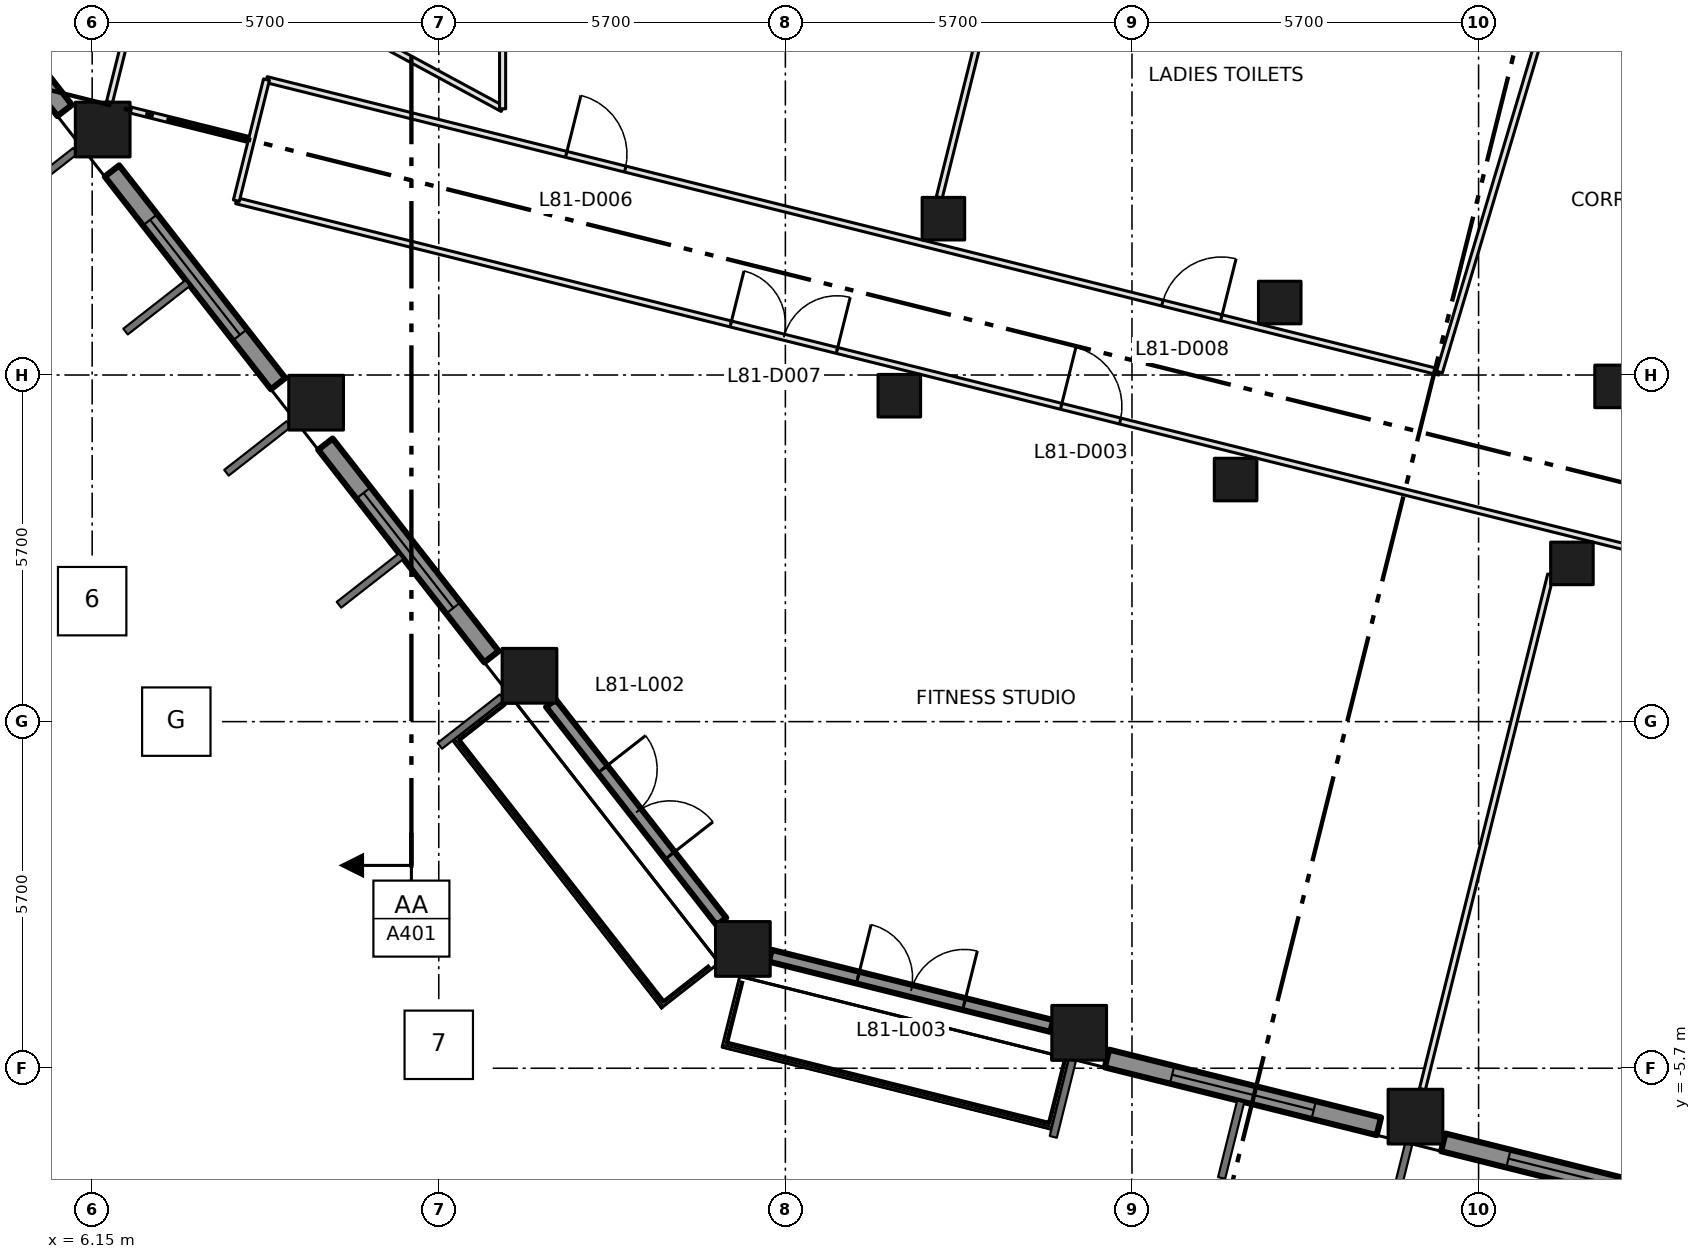
"""IFC4 building model, lengths in metres.
Left out: names, types, materials, properties, quantities, classifications, styles, units other than length and angle.
Written with IfcOpenShell. Run it as: python <this file> out.ifc"""

import sys

from ifc_helpers import new_model, si_unit, direction, frame, frame_2d, origin, origin_2d, place, context, subcontext, project, spatial, rectangle, extrude, element, fill, save


model = new_model("IFC4")
c1 = context("Model", 3, precision=1e-05, world=origin(), true_north=direction((0.0, 1.0)))
c2 = subcontext(c1, "Body", "Model", "MODEL_VIEW")
j1 = project(units=[si_unit("LENGTHUNIT", "METRE"), si_unit("PLANEANGLEUNIT", "RADIAN")], contexts=[c1])
p1 = place(None, origin())
s1 = spatial("IfcSite", under=j1, at=p1, CompositionType="ELEMENT")
p2 = place(p1, origin())
s2 = spatial("IfcBuilding", under=s1, at=p2, CompositionType="ELEMENT")
p3 = place(p2, frame((0.0, 0.0, 354.0)))
s3 = spatial("IfcBuildingStorey", under=s2, at=p3, CompositionType="ELEMENT", Elevation=354.0)
for number, where, z_axis, x_axis in (
    (1, (16.851, -3.738, 0.0), (0.0, 0.0, 1.0), (1.0, 0.0, 0.0)),
    (2, (13.342, 0.754, 0.0), (0.0, 0.0, 1.0), (1.0, 0.0, 0.0)),
    (3, (9.833, 5.245, 0.0), (0.0, 0.0, 1.0), (1.0, 0.0, 0.0)),
    (4, (6.323, 9.737, 0.0), (0.0, 0.0, 1.0), (1.0, 0.0, 0.0)),
    (5, (22.382, -5.117, 0.0), (0.0, 0.0, 1.0), (1.0, 0.0, 0.0)),
    (6, (27.912, -6.496, 0.0), (0.0, 0.0, 1.0), (1.0, 0.0, 0.0)),
):
    element("IfcColumn", number, at=place(p3, frame(where, z_axis=z_axis, x_axis=x_axis)), inside=s3, PredefinedType="COLUMN", context=c2, shape_type="SweptSolid", body=[
        extrude(rectangle(XDim=0.9, YDim=0.9, at=origin_2d()), origin(), (0.0, 0.0, 1.0), 4.2),
    ])
for number, where, z_axis, x_axis in (
    (7, (19.424, 5.36, 0.0), (0.0, 0.0, 1.0), (1.0, 0.0, 0.0)),
    (8, (24.954, 3.981, 0.0), (0.0, 0.0, 1.0), (1.0, 0.0, 0.0)),
    (9, (30.485, 2.602, 0.0), (0.0, 0.0, 1.0), (1.0, 0.0, 0.0)),
    (10, (20.149, 8.271, 0.0), (0.0, 0.0, 1.0), (1.0, 0.0, 0.0)),
    (11, (25.68, 6.892, 0.0), (0.0, 0.0, 1.0), (1.0, 0.0, 0.0)),
    (12, (31.211, 5.513, 0.0), (0.0, 0.0, 1.0), (1.0, 0.0, 0.0)),
):
    element("IfcColumn", number, at=place(p3, frame(where, z_axis=z_axis, x_axis=x_axis)), inside=s3, PredefinedType="COLUMN", context=c2, shape_type="SweptSolid", body=[
        extrude(rectangle(XDim=0.7, YDim=0.7, at=origin_2d()), origin(), (0.0, 0.0, 1.0), 4.2),
    ])
p4 = place(p3, frame((2.967, 13.547, 0.0), z_axis=(0.0, 0.0, 1.0), x_axis=(0.615486001463, -0.788147817356, 0.0)))
e13 = element("IfcWall", 13, at=p4, inside=s3, PredefinedType="SOLIDWALL", context=c2, shape_type="SweptSolid", body=[
    extrude(rectangle(XDim=4.437, YDim=0.3, at=frame_2d((2.219, 0.0))), origin(), (0.0, 0.0, 1.0), 3.2),
])
p5 = place(p4, frame((1.018, 0.0, 0.8)))
e14 = element("IfcOpeningElement", 14, at=p5, cuts=e13, PredefinedType="OPENING", context=c2, shape_type="SweptSolid", body=[
    extrude(rectangle(XDim=2.4, YDim=2.1, at=frame_2d((1.2, 1.05))), frame((0.0, 0.16, 0.0), z_axis=(0.0, -1.0, 0.0), x_axis=(1.0, 0.0, 0.0)), (0.0, 0.0, 1.0), 0.32),
])
p6 = place(p3, frame((6.476, 9.055, 0.0), z_axis=(0.0, 0.0, 1.0), x_axis=(0.615649380255, -0.788020203162, 0.0)))
e15 = element("IfcWall", 15, at=p6, inside=s3, PredefinedType="SOLIDWALL", context=c2, shape_type="SweptSolid", body=[
    extrude(rectangle(XDim=4.438, YDim=0.3, at=frame_2d((2.219, 0.0))), origin(), (0.0, 0.0, 1.0), 3.2),
])
p7 = place(p6, frame((1.019, 0.0, 0.8)))
e16 = element("IfcOpeningElement", 16, at=p7, cuts=e15, PredefinedType="OPENING", context=c2, shape_type="SweptSolid", body=[
    extrude(rectangle(XDim=2.4, YDim=2.1, at=frame_2d((1.2, 1.05))), frame((0.0, 0.16, 0.0), z_axis=(0.0, -1.0, 0.0), x_axis=(1.0, 0.0, 0.0)), (0.0, 0.0, 1.0), 0.32),
])
p8 = place(p3, frame((9.986, 4.563, 0.0), z_axis=(0.0, 0.0, 1.0), x_axis=(0.615592779411, -0.788064419915, 0.0)))
e17 = element("IfcWall", 17, at=p8, inside=s3, PredefinedType="SOLIDWALL", context=c2, shape_type="SweptSolid", body=[
    extrude(rectangle(XDim=4.436, YDim=0.3, at=frame_2d((2.218, 0.0))), origin(), (0.0, 0.0, 1.0), 3.2),
])
p9 = place(p8, frame((1.018, 0.0, 0.8)))
e18 = element("IfcOpeningElement", 18, at=p9, cuts=e17, PredefinedType="OPENING", context=c2, shape_type="SweptSolid", body=[
    extrude(rectangle(XDim=2.4, YDim=2.1, at=frame_2d((1.2, 1.05))), frame((0.0, 0.16, 0.0), z_axis=(0.0, -1.0, 0.0), x_axis=(1.0, 0.0, 0.0)), (0.0, 0.0, 1.0), 0.32),
])
p10 = place(p3, frame((13.694, 0.304, 0.0), z_axis=(0.0, 0.0, 1.0), x_axis=(0.615460024179, -0.788168103033, 0.0)))
e19 = element("IfcWall", 19, at=p10, inside=s3, PredefinedType="SOLIDWALL", context=c2, shape_type="SweptSolid", body=[
    extrude(rectangle(XDim=4.557, YDim=0.2, at=frame_2d((2.279, 0.0))), origin(), (0.0, 0.0, 1.0), 3.2),
])
p11 = place(p10, frame((1.379, 0.0, 0.0)))
e20 = element("IfcOpeningElement", 20, at=p11, cuts=e19, PredefinedType="OPENING", context=c2, shape_type="SweptSolid", body=[
    extrude(rectangle(XDim=1.8, YDim=2.9, at=frame_2d((0.9, 1.45))), frame((0.0, 0.11, 0.0), z_axis=(0.0, -1.0, 0.0), x_axis=(1.0, 0.0, 0.0)), (0.0, 0.0, 1.0), 0.22),
])
p12 = place(p3, frame((12.398, -0.199, 0.0), z_axis=(0.0, 0.0, 1.0), x_axis=(0.615638738903, -0.788028516719, 0.0)))
e21 = element("IfcWall", 21, at=p12, inside=s3, PredefinedType="SOLIDWALL", context=c2, shape_type="SweptSolid", body=[
    extrude(rectangle(XDim=5.36, YDim=0.4, at=frame_2d((2.68, 0.0))), origin(), (0.0, 0.0, 1.0), 0.3),
])
p13 = place(p3, frame((17.301, -3.85, 0.0), z_axis=(0.0, 0.0, 1.0), x_axis=(0.970286762598, -0.241957844111, 0.0)))
e22 = element("IfcWall", 22, at=p13, inside=s3, PredefinedType="SOLIDWALL", context=c2, shape_type="SweptSolid", body=[
    extrude(rectangle(XDim=4.773, YDim=0.2, at=frame_2d((2.386, 0.0))), origin(), (0.0, 0.0, 1.0), 3.2),
])
p14 = place(p13, frame((1.486, 0.0, 0.0)))
e23 = element("IfcOpeningElement", 23, at=p14, cuts=e22, PredefinedType="OPENING", context=c2, shape_type="SweptSolid", body=[
    extrude(rectangle(XDim=1.8, YDim=2.9, at=frame_2d((0.9, 1.45))), frame((0.0, 0.11, 0.0), z_axis=(0.0, -1.0, 0.0), x_axis=(1.0, 0.0, 0.0)), (0.0, 0.0, 1.0), 0.22),
])
p15 = place(p3, frame((16.694, -5.069, 0.0), z_axis=(0.0, 0.0, 1.0), x_axis=(0.970289679319, -0.241946147329, 0.0)))
e24 = element("IfcWall", 24, at=p15, inside=s3, PredefinedType="SOLIDWALL", context=c2, shape_type="SweptSolid", body=[
    extrude(rectangle(XDim=5.36, YDim=0.4, at=frame_2d((2.68, 0.0))), origin(), (0.0, 0.0, 1.0), 0.3),
])
p16 = place(p3, frame((22.839, -5.54, 0.0), z_axis=(0.0, 0.0, 1.0), x_axis=(0.970282587769, -0.241974585177, 0.0)))
e25 = element("IfcWall", 25, at=p16, inside=s3, PredefinedType="SOLIDWALL", context=c2, shape_type="SweptSolid", body=[
    extrude(rectangle(XDim=4.608, YDim=0.3, at=frame_2d((2.304, 0.0))), origin(), (0.0, 0.0, 1.0), 3.2),
])
p17 = place(p16, frame((1.104, 0.0, 0.8)))
e26 = element("IfcOpeningElement", 26, at=p17, cuts=e25, PredefinedType="OPENING", context=c2, shape_type="SweptSolid", body=[
    extrude(rectangle(XDim=2.4, YDim=2.1, at=frame_2d((1.2, 1.05))), frame((0.0, 0.16, 0.0), z_axis=(0.0, -1.0, 0.0), x_axis=(1.0, 0.0, 0.0)), (0.0, 0.0, 1.0), 0.32),
])
p18 = place(p3, frame((28.369, -6.919, 0.0), z_axis=(0.0, 0.0, 1.0), x_axis=(0.970298093093, -0.241912402618, 0.0)))
e27 = element("IfcWall", 27, at=p18, inside=s3, PredefinedType="SOLIDWALL", context=c2, shape_type="SweptSolid", body=[
    extrude(rectangle(XDim=4.609, YDim=0.3, at=frame_2d((2.305, 0.0))), origin(), (0.0, 0.0, 1.0), 3.2),
])
p19 = place(p18, frame((1.105, 0.0, 0.8)))
e28 = element("IfcOpeningElement", 28, at=p19, cuts=e27, PredefinedType="OPENING", context=c2, shape_type="SweptSolid", body=[
    extrude(rectangle(XDim=2.4, YDim=2.1, at=frame_2d((1.2, 1.05))), frame((0.0, 0.16, 0.0), z_axis=(0.0, -1.0, 0.0), x_axis=(1.0, 0.0, 0.0)), (0.0, 0.0, 1.0), 0.32),
])
p20 = place(p3, frame((8.521, 8.567, 0.0), z_axis=(0.0, 0.0, 1.0), x_axis=(0.970303035129, -0.241892579506, 0.0)))
e29 = element("IfcWall", 29, at=p20, inside=s3, PredefinedType="PARTITIONING", context=c2, shape_type="SweptSolid", body=[
    extrude(rectangle(XDim=28.5, YDim=0.1, at=frame_2d((14.25, 0.0))), origin(), (0.0, 0.0, 1.0), 3.9),
])
p21 = place(p20, frame((13.98, 0.0, 0.0)))
e30 = element("IfcOpeningElement", 30, at=p21, cuts=e29, PredefinedType="OPENING", context=c2, shape_type="SweptSolid", body=[
    extrude(rectangle(XDim=1.0, YDim=2.1, at=frame_2d((0.5, 1.05))), frame((0.0, 0.06, 0.0), z_axis=(0.0, -1.0, 0.0), x_axis=(1.0, 0.0, 0.0)), (0.0, 0.0, 1.0), 0.12),
])
p22 = place(p20, frame((8.38, 0.0, 0.0)))
e31 = element("IfcOpeningElement", 31, at=p22, cuts=e29, PredefinedType="OPENING", context=c2, shape_type="SweptSolid", body=[
    extrude(rectangle(XDim=1.8, YDim=2.1, at=frame_2d((0.9, 1.05))), frame((0.0, 0.06, 0.0), z_axis=(0.0, -1.0, 0.0), x_axis=(1.0, 0.0, 0.0)), (0.0, 0.0, 1.0), 0.12),
])
p23 = place(p3, frame((9.017, 10.558, 0.0), z_axis=(0.0, 0.0, 1.0), x_axis=(0.970286089829, -0.241960542, 0.0)))
e32 = element("IfcWall", 32, at=p23, inside=s3, PredefinedType="PARTITIONING", context=c2, shape_type="SweptSolid", body=[
    extrude(rectangle(XDim=19.879, YDim=0.1, at=frame_2d((9.94, 0.0))), origin(), (0.0, 0.0, 1.0), 3.9),
])
p24 = place(p23, frame((5.08, 0.0, 0.0)))
e33 = element("IfcOpeningElement", 33, at=p24, cuts=e32, PredefinedType="OPENING", context=c2, shape_type="SweptSolid", body=[
    extrude(rectangle(XDim=1.0, YDim=2.1, at=frame_2d((0.5, 1.05))), frame((0.0, 0.06, 0.0), z_axis=(0.0, -1.0, 0.0), x_axis=(1.0, 0.0, 0.0)), (0.0, 0.0, 1.0), 0.12),
])
p25 = place(p23, frame((15.184, 0.0, 0.0)))
e34 = element("IfcOpeningElement", 34, at=p25, cuts=e32, PredefinedType="OPENING", context=c2, shape_type="SweptSolid", body=[
    extrude(rectangle(XDim=1.0, YDim=2.1, at=frame_2d((0.5, 1.05))), frame((0.0, 0.06, 0.0), z_axis=(0.0, -1.0, 0.0), x_axis=(1.0, 0.0, 0.0)), (0.0, 0.0, 1.0), 0.12),
])
p26 = place(p3, frame((9.017, 10.558, 0.0), z_axis=(0.0, 0.0, 1.0), x_axis=(-0.241751728323, -0.970338137895, 0.0)))
e35 = element("IfcWall", 35, at=p26, inside=s3, PredefinedType="PARTITIONING", context=c2, shape_type="SweptSolid", body=[
    extrude(rectangle(XDim=2.052, YDim=0.1, at=frame_2d((1.026, 0.0))), origin(), (0.0, 0.0, 1.0), 3.9),
])
p27 = place(p3, frame((9.9, 11.7, 0.0), z_axis=(0.0, 0.0, 1.0), x_axis=(0.87965147249, -0.475618846291, 0.0)))
e36 = element("IfcWall", 36, at=p27, inside=s3, PredefinedType="PARTITIONING", context=c2, shape_type="SweptSolid", body=[
    extrude(rectangle(XDim=3.41, YDim=0.1, at=frame_2d((1.705, 0.0))), origin(), (0.0, 0.0, 1.0), 3.9),
])
p28 = place(p3, frame((12.9, 10.078, 0.0), z_axis=(0.0, 0.0, 1.0), x_axis=(0.0, 1.0, 0.0)))
e37 = element("IfcWall", 37, at=p28, inside=s3, PredefinedType="PARTITIONING", context=c2, shape_type="SweptSolid", body=[
    extrude(rectangle(XDim=4.022, YDim=0.1, at=frame_2d((2.011, 0.0))), origin(), (0.0, 0.0, 1.0), 3.9),
])
p29 = place(p3, frame((30.8, 14.1, 0.0), z_axis=(0.0, 0.0, 1.0), x_axis=(-0.286139929679, -0.958187842045, 0.0)))
e38 = element("IfcWall", 38, at=p29, inside=s3, PredefinedType="PARTITIONING", context=c2, shape_type="SweptSolid", body=[
    extrude(rectangle(XDim=8.717, YDim=0.1, at=frame_2d((4.358, 0.0))), origin(), (0.0, 0.0, 1.0), 3.9),
])
p30 = place(p3, frame((6.797, 11.638, 0.0), z_axis=(0.0, 0.0, 1.0), x_axis=(-0.242113049408, -0.970248046278, 0.0)))
e39 = element("IfcWall", 39, at=p30, inside=s3, PredefinedType="PARTITIONING", context=c2, shape_type="SweptSolid", body=[
    extrude(rectangle(XDim=1.495, YDim=0.1, at=frame_2d((0.748, 0.0))), origin(), (0.0, 0.0, 1.0), 3.9),
])
p31 = place(p3, frame((8.72, 9.574, 0.0), z_axis=(0.0, 0.0, 1.0), x_axis=(-0.970221168815, 0.24222073318, 0.0)))
e40 = element("IfcWall", 40, at=p31, inside=s3, PredefinedType="PARTITIONING", context=c2, shape_type="SweptSolid", body=[
    extrude(rectangle(XDim=2.007, YDim=0.1, at=frame_2d((1.003, 0.0))), origin(), (0.0, 0.0, 1.0), 3.9),
])
p32 = place(p3, frame((20.081, 8.621, 0.0), z_axis=(0.0, 0.0, 1.0), x_axis=(0.241904838353, 0.970299978966, 0.0)))
e41 = element("IfcWall", 41, at=p32, inside=s3, PredefinedType="PARTITIONING", context=c2, shape_type="SweptSolid", body=[
    extrude(rectangle(XDim=5.647, YDim=0.1, at=frame_2d((2.823, 0.0))), origin(), (0.0, 0.0, 1.0), 3.9),
])
p33 = place(p3, frame((28.026, -6.046, 0.0), z_axis=(0.0, 0.0, 1.0), x_axis=(0.241850505633, 0.970313523004, 0.0)))
e42 = element("IfcWall", 42, at=p33, inside=s3, PredefinedType="PARTITIONING", context=c2, shape_type="SweptSolid", body=[
    extrude(rectangle(XDim=8.721, YDim=0.1, at=frame_2d((4.36, 0.0))), origin(), (0.0, 0.0, 1.0), 3.9),
])
p34 = place(p7, origin())
e43 = element("IfcWindow", 43, at=p34, inside=s3, PartitioningType="DOUBLE_PANEL_VERTICAL", PredefinedType="WINDOW", context=c2, shape_type="SweptSolid", body=[
    extrude(rectangle(XDim=2.4, YDim=2.1, at=frame_2d((1.2, 1.05))), frame((0.0, 0.03, 0.0), z_axis=(0.0, -1.0, 0.0), x_axis=(1.0, 0.0, 0.0)), (0.0, 0.0, 1.0), 0.06),
])
fill(e16, e43)
p35 = place(p9, origin())
e44 = element("IfcWindow", 44, at=p35, inside=s3, PartitioningType="DOUBLE_PANEL_VERTICAL", PredefinedType="WINDOW", context=c2, shape_type="SweptSolid", body=[
    extrude(rectangle(XDim=2.4, YDim=2.1, at=frame_2d((1.2, 1.05))), frame((0.0, 0.03, 0.0), z_axis=(0.0, -1.0, 0.0), x_axis=(1.0, 0.0, 0.0)), (0.0, 0.0, 1.0), 0.06),
])
fill(e18, e44)
p36 = place(p11, origin())
e45 = element("IfcDoor", 45, at=p36, inside=s3, OperationType="DOUBLE_DOOR_SINGLE_SWING", PredefinedType="DOOR", context=c2, shape_type="SweptSolid", body=[
    extrude(rectangle(XDim=1.8, YDim=2.9, at=frame_2d((0.9, 1.45))), frame((0.0, 0.025, 0.0), z_axis=(0.0, -1.0, 0.0), x_axis=(1.0, 0.0, 0.0)), (0.0, 0.0, 1.0), 0.05),
])
fill(e20, e45)
p37 = place(p14, origin())
e46 = element("IfcDoor", 46, at=p37, inside=s3, OperationType="DOUBLE_DOOR_SINGLE_SWING", PredefinedType="DOOR", context=c2, shape_type="SweptSolid", body=[
    extrude(rectangle(XDim=1.8, YDim=2.9, at=frame_2d((0.9, 1.45))), frame((0.0, 0.025, 0.0), z_axis=(0.0, -1.0, 0.0), x_axis=(1.0, 0.0, 0.0)), (0.0, 0.0, 1.0), 0.05),
])
fill(e23, e46)
p38 = place(p17, origin())
e47 = element("IfcWindow", 47, at=p38, inside=s3, PartitioningType="DOUBLE_PANEL_VERTICAL", PredefinedType="WINDOW", context=c2, shape_type="SweptSolid", body=[
    extrude(rectangle(XDim=2.4, YDim=2.1, at=frame_2d((1.2, 1.05))), frame((0.0, 0.03, 0.0), z_axis=(0.0, -1.0, 0.0), x_axis=(1.0, 0.0, 0.0)), (0.0, 0.0, 1.0), 0.06),
])
fill(e26, e47)
p39 = place(p19, origin())
e48 = element("IfcWindow", 48, at=p39, inside=s3, PartitioningType="DOUBLE_PANEL_VERTICAL", PredefinedType="WINDOW", context=c2, shape_type="SweptSolid", body=[
    extrude(rectangle(XDim=2.4, YDim=2.1, at=frame_2d((1.2, 1.05))), frame((0.0, 0.03, 0.0), z_axis=(0.0, -1.0, 0.0), x_axis=(1.0, 0.0, 0.0)), (0.0, 0.0, 1.0), 0.06),
])
fill(e28, e48)
p40 = place(p21, origin())
e49 = element("IfcDoor", 49, at=p40, inside=s3, OperationType="SINGLE_SWING_LEFT", PredefinedType="DOOR", context=c2, shape_type="SweptSolid", body=[
    extrude(rectangle(XDim=1.0, YDim=2.1, at=frame_2d((0.5, 1.05))), frame((0.0, 0.025, 0.0), z_axis=(0.0, -1.0, 0.0), x_axis=(1.0, 0.0, 0.0)), (0.0, 0.0, 1.0), 0.05),
])
fill(e30, e49)
p41 = place(p24, origin())
e50 = element("IfcDoor", 50, at=p41, inside=s3, OperationType="SINGLE_SWING_LEFT", PredefinedType="DOOR", context=c2, shape_type="SweptSolid", body=[
    extrude(rectangle(XDim=1.0, YDim=2.1, at=frame_2d((0.5, 1.05))), frame((0.0, 0.025, 0.0), z_axis=(0.0, -1.0, 0.0), x_axis=(1.0, 0.0, 0.0)), (0.0, 0.0, 1.0), 0.05),
])
fill(e33, e50)
p42 = place(p22, origin())
e51 = element("IfcDoor", 51, at=p42, inside=s3, OperationType="DOUBLE_DOOR_SINGLE_SWING", PredefinedType="DOOR", context=c2, shape_type="SweptSolid", body=[
    extrude(rectangle(XDim=1.8, YDim=2.1, at=frame_2d((0.9, 1.05))), frame((0.0, 0.025, 0.0), z_axis=(0.0, -1.0, 0.0), x_axis=(1.0, 0.0, 0.0)), (0.0, 0.0, 1.0), 0.05),
])
fill(e31, e51)
p43 = place(p25, origin())
e52 = element("IfcDoor", 52, at=p43, inside=s3, OperationType="SINGLE_SWING_RIGHT", PredefinedType="DOOR", context=c2, shape_type="SweptSolid", body=[
    extrude(rectangle(XDim=1.0, YDim=2.1, at=frame_2d((0.5, 1.05))), frame((0.0, 0.025, 0.0), z_axis=(0.0, -1.0, 0.0), x_axis=(1.0, 0.0, 0.0)), (0.0, 0.0, 1.0), 0.05),
])
fill(e34, e52)
save(model, sys.argv[1])
